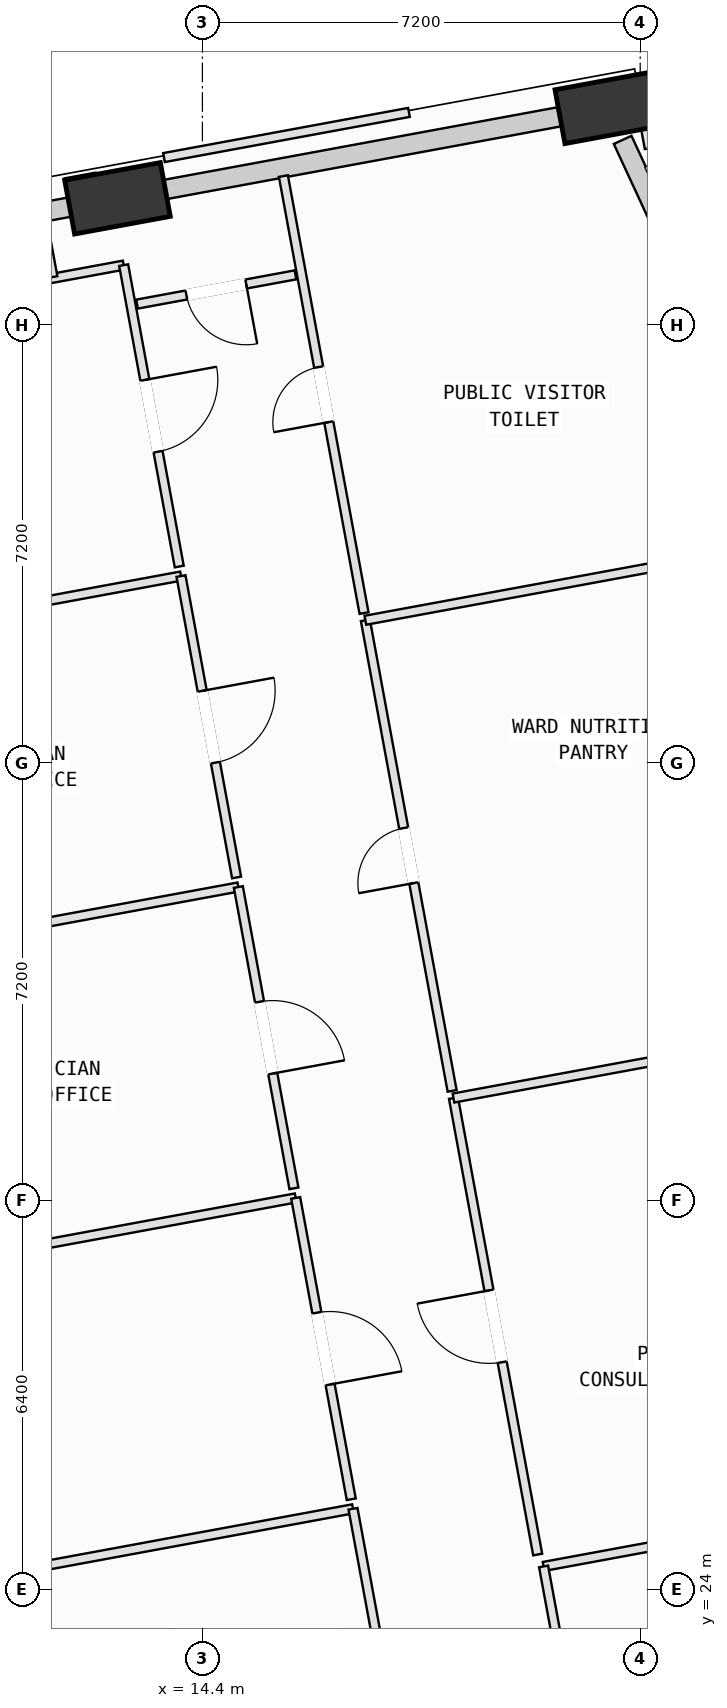
"""IFC4 building model, lengths in metres.
Left out: names, types, materials, properties, quantities, classifications, styles, units other than length and angle.
Written with IfcOpenShell. Run it as: python <this file> out.ifc"""

import sys

from ifc_helpers import new_model, si_unit, direction, frame, frame_2d, origin, origin_2d, place, context, subcontext, project, spatial, rectangle, extrude, element, fill, save


model = new_model("IFC4")
c1 = context("Model", 3, precision=1e-05, world=origin(), true_north=direction((0.0, 1.0)))
c2 = subcontext(c1, "Body", "Model", "MODEL_VIEW")
j1 = project(units=[si_unit("LENGTHUNIT", "METRE"), si_unit("PLANEANGLEUNIT", "RADIAN")], contexts=[c1])
p1 = place(None, origin())
s1 = spatial("IfcSite", under=j1, at=p1, CompositionType="ELEMENT")
p2 = place(p1, origin())
s2 = spatial("IfcBuilding", under=s1, at=p2, CompositionType="ELEMENT")
p3 = place(p2, frame((0.0, 0.0, 67.0)))
s3 = spatial("IfcBuildingStorey", under=s2, at=p3, CompositionType="ELEMENT", Elevation=67.0)
p4 = place(p3, frame((21.067, 48.368, 0.002), z_axis=(-0.09666113666, -0.052459310348, 0.99393392407), x_axis=(0.627529490688, -0.778337220111, 0.019947684239)))
e1 = element("IfcColumn", 1, at=p4, inside=s3, PredefinedType="COLUMN", context=c2, shape_type="SweptSolid", body=[
    extrude(rectangle(XDim=1.6, YDim=0.9, at=origin_2d()), origin(), (0.0, 0.0, 1.0), 4.021),
])
p5 = place(p3, frame((13.003, 46.88, 0.002), z_axis=(-0.090133434514, -0.085466134946, 0.992255765294), x_axis=(0.80725313107, -0.589775227835, 0.022529159111)))
e2 = element("IfcColumn", 2, at=p5, inside=s3, PredefinedType="COLUMN", context=c2, shape_type="SweptSolid", body=[
    extrude(rectangle(XDim=1.6, YDim=0.9, at=origin_2d()), origin(), (0.0, 0.0, 1.0), 4.028),
])
p6 = place(p3, frame((21.311, 47.841, 0.0), z_axis=(0.0, 0.0, 1.0), x_axis=(0.419944609939, -0.907549736699, 0.0)))
e3 = element("IfcWall", 3, at=p6, inside=s3, PredefinedType="SOLIDWALL", context=c2, shape_type="SweptSolid", body=[
    extrude(rectangle(XDim=4.889, YDim=0.32, at=frame_2d((2.445, 0.0))), origin(), (0.0, 0.0, 1.0), 3.165),
])
p7 = place(p6, frame((1.915, 0.0, 0.75)))
e4 = element("IfcOpeningElement", 4, at=p7, cuts=e3, PredefinedType="OPENING", context=c2, shape_type="SweptSolid", body=[
    extrude(rectangle(XDim=1.8, YDim=2.05, at=frame_2d((0.9, 1.025))), frame((0.0, 0.17, 0.0), z_axis=(0.0, -1.0, 0.0), x_axis=(1.0, 0.0, 0.0)), (0.0, 0.0, 1.0), 0.34),
])
p8 = place(p3, frame((13.38, 46.95, 0.0), z_axis=(0.0, 0.0, 1.0), x_axis=(0.98341213731, 0.181385137737, 0.0)))
e5 = element("IfcWall", 5, at=p8, inside=s3, PredefinedType="SOLIDWALL", context=c2, shape_type="SweptSolid", body=[
    extrude(rectangle(XDim=7.003, YDim=0.32, at=frame_2d((3.501, 0.0))), origin(), (0.0, 0.0, 1.0), 3.165),
])
p9 = place(p3, frame((5.297, 45.459, 0.0), z_axis=(0.0, 0.0, 1.0), x_axis=(0.983408574272, 0.181404454324, 0.0)))
e6 = element("IfcWall", 6, at=p9, inside=s3, PredefinedType="SOLIDWALL", context=c2, shape_type="SweptSolid", body=[
    extrude(rectangle(XDim=7.035, YDim=0.32, at=frame_2d((3.517, 0.0))), origin(), (0.0, 0.0, 1.0), 3.165),
])
p10 = place(p3, frame((6.094, 23.337, 0.0), z_axis=(0.0, 0.0, 1.0), x_axis=(0.983409627974, 0.181398742027, 0.0)))
e7 = element("IfcWall", 7, at=p10, inside=s3, PredefinedType="PARTITIONING", context=c2, shape_type="SweptSolid", body=[
    extrude(rectangle(XDim=10.965, YDim=0.15, at=frame_2d((5.482, 0.0))), origin(), (0.0, 0.0, 1.0), 3.78),
])
p11 = place(p3, frame((16.877, 25.326, 0.0), z_axis=(0.0, 0.0, 1.0), x_axis=(0.181511352998, -0.983388849201, 0.0)))
e8 = element("IfcWall", 8, at=p11, inside=s3, PredefinedType="PARTITIONING", context=c2, shape_type="SweptSolid", body=[
    extrude(rectangle(XDim=4.826, YDim=0.15, at=frame_2d((2.413, 0.0))), origin(), (0.0, 0.0, 1.0), 3.78),
])
p12 = place(p3, frame((4.792, 28.384, 0.0), z_axis=(0.0, 0.0, 1.0), x_axis=(0.983414775283, 0.181370834909, 0.0)))
e9 = element("IfcWall", 9, at=p12, inside=s3, PredefinedType="PARTITIONING", context=c2, shape_type="SweptSolid", body=[
    extrude(rectangle(XDim=11.33, YDim=0.15, at=frame_2d((5.665, 0.0))), origin(), (0.0, 0.0, 1.0), 3.78),
])
p13 = place(p3, frame((15.934, 30.439, 0.0), z_axis=(0.0, 0.0, 1.0), x_axis=(0.181327650792, -0.983422738734, 0.0)))
e10 = element("IfcWall", 10, at=p13, inside=s3, PredefinedType="PARTITIONING", context=c2, shape_type="SweptSolid", body=[
    extrude(rectangle(XDim=5.04, YDim=0.15, at=frame_2d((2.52, 0.0))), origin(), (0.0, 0.0, 1.0), 3.78),
])
p14 = place(p13, frame((1.92, 0.0, 0.0)))
e11 = element("IfcOpeningElement", 11, at=p14, cuts=e10, PredefinedType="OPENING", context=c2, shape_type="SweptSolid", body=[
    extrude(rectangle(XDim=1.2, YDim=2.15, at=frame_2d((0.6, 1.075))), frame((0.0, 0.085, 0.0), z_axis=(0.0, -1.0, 0.0), x_axis=(1.0, 0.0, 0.0)), (0.0, 0.0, 1.0), 0.17),
])
p15 = place(p3, frame((4.208, 33.564, 0.0), z_axis=(0.0, 0.0, 1.0), x_axis=(0.983409627974, 0.181398742027, 0.0)))
e12 = element("IfcWall", 12, at=p15, inside=s3, PredefinedType="PARTITIONING", context=c2, shape_type="SweptSolid", body=[
    extrude(rectangle(XDim=10.965, YDim=0.15, at=frame_2d((5.482, 0.0))), origin(), (0.0, 0.0, 1.0), 3.78),
])
p16 = place(p3, frame((14.991, 35.553, 0.0), z_axis=(0.0, 0.0, 1.0), x_axis=(0.181374501804, -0.983414098992, 0.0)))
e13 = element("IfcWall", 13, at=p16, inside=s3, PredefinedType="PARTITIONING", context=c2, shape_type="SweptSolid", body=[
    extrude(rectangle(XDim=5.04, YDim=0.15, at=frame_2d((2.52, 0.0))), origin(), (0.0, 0.0, 1.0), 3.78),
])
p17 = place(p16, frame((1.92, 0.0, 0.0)))
e14 = element("IfcOpeningElement", 14, at=p17, cuts=e13, PredefinedType="OPENING", context=c2, shape_type="SweptSolid", body=[
    extrude(rectangle(XDim=1.2, YDim=2.15, at=frame_2d((0.6, 1.075))), frame((0.0, 0.085, 0.0), z_axis=(0.0, -1.0, 0.0), x_axis=(1.0, 0.0, 0.0)), (0.0, 0.0, 1.0), 0.17),
])
p18 = place(p3, frame((3.265, 38.678, 0.0), z_axis=(0.0, 0.0, 1.0), x_axis=(0.983410360614, 0.181394770149, 0.0)))
e15 = element("IfcWall", 15, at=p18, inside=s3, PredefinedType="PARTITIONING", context=c2, shape_type="SweptSolid", body=[
    extrude(rectangle(XDim=10.965, YDim=0.15, at=frame_2d((5.482, 0.0))), origin(), (0.0, 0.0, 1.0), 3.78),
])
p19 = place(p3, frame((14.048, 40.667, 0.0), z_axis=(0.0, 0.0, 1.0), x_axis=(0.181293102456, -0.983429108275, 0.0)))
e16 = element("IfcWall", 16, at=p19, inside=s3, PredefinedType="PARTITIONING", context=c2, shape_type="SweptSolid", body=[
    extrude(rectangle(XDim=5.041, YDim=0.15, at=frame_2d((2.52, 0.0))), origin(), (0.0, 0.0, 1.0), 3.78),
])
p20 = place(p19, frame((1.92, 0.0, 0.0)))
e17 = element("IfcOpeningElement", 17, at=p20, cuts=e16, PredefinedType="OPENING", context=c2, shape_type="SweptSolid", body=[
    extrude(rectangle(XDim=1.2, YDim=2.15, at=frame_2d((0.6, 1.075))), frame((0.0, 0.085, 0.0), z_axis=(0.0, -1.0, 0.0), x_axis=(1.0, 0.0, 0.0)), (0.0, 0.0, 1.0), 0.17),
])
p21 = place(p3, frame((4.465, 44.187, 0.0), z_axis=(0.0, 0.0, 1.0), x_axis=(0.983403773202, 0.181430479393, 0.0)))
e18 = element("IfcWall", 18, at=p21, inside=s3, PredefinedType="PARTITIONING", context=c2, shape_type="SweptSolid", body=[
    extrude(rectangle(XDim=8.786, YDim=0.15, at=frame_2d((4.393, 0.0))), origin(), (0.0, 0.0, 1.0), 3.78),
])
p22 = place(p3, frame((13.105, 45.781, 0.0), z_axis=(0.0, 0.0, 1.0), x_axis=(0.181339945149, -0.983420471769, 0.0)))
e19 = element("IfcWall", 19, at=p22, inside=s3, PredefinedType="PARTITIONING", context=c2, shape_type="SweptSolid", body=[
    extrude(rectangle(XDim=5.041, YDim=0.15, at=frame_2d((2.52, 0.0))), origin(), (0.0, 0.0, 1.0), 2.865),
])
p23 = place(p22, frame((1.92, 0.0, 0.0)))
e20 = element("IfcOpeningElement", 20, at=p23, cuts=e19, PredefinedType="OPENING", context=c2, shape_type="SweptSolid", body=[
    extrude(rectangle(XDim=1.2, YDim=2.15, at=frame_2d((0.6, 1.075))), frame((0.0, 0.085, 0.0), z_axis=(0.0, -1.0, 0.0), x_axis=(1.0, 0.0, 0.0)), (0.0, 0.0, 1.0), 0.17),
])
p24 = place(p3, frame((20.011, 24.378, 0.0), z_axis=(0.0, 0.0, 1.0), x_axis=(0.983391113063, 0.181499087461, 0.0)))
e21 = element("IfcWall", 21, at=p24, inside=s3, PredefinedType="PARTITIONING", context=c2, shape_type="SweptSolid", body=[
    extrude(rectangle(XDim=6.755, YDim=0.15, at=frame_2d((3.378, 0.0))), origin(), (0.0, 0.0, 1.0), 3.78),
])
p25 = place(p3, frame((20.712, 20.58, 0.0), z_axis=(0.0, 0.0, 1.0), x_axis=(-0.181493870528, 0.983392075909, 0.0)))
e22 = element("IfcWall", 22, at=p25, inside=s3, PredefinedType="PARTITIONING", context=c2, shape_type="SweptSolid", body=[
    extrude(rectangle(XDim=3.862, YDim=0.15, at=frame_2d((1.931, 0.0))), origin(), (0.0, 0.0, 1.0), 3.78),
])
p26 = place(p3, frame((19.914, 24.574, 0.0), z_axis=(0.0, 0.0, 1.0), x_axis=(-0.181409034839, 0.983407729316, 0.0)))
e23 = element("IfcWall", 23, at=p26, inside=s3, PredefinedType="PARTITIONING", context=c2, shape_type="SweptSolid", body=[
    extrude(rectangle(XDim=7.635, YDim=0.15, at=frame_2d((3.817, 0.0))), origin(), (0.0, 0.0, 1.0), 3.78),
])
p27 = place(p26, frame((3.217, 0.0, 0.0)))
e24 = element("IfcOpeningElement", 24, at=p27, cuts=e23, PredefinedType="OPENING", context=c2, shape_type="SweptSolid", body=[
    extrude(rectangle(XDim=1.2, YDim=2.15, at=frame_2d((0.6, 1.075))), frame((0.0, 0.085, 0.0), z_axis=(0.0, -1.0, 0.0), x_axis=(1.0, 0.0, 0.0)), (0.0, 0.0, 1.0), 0.17),
])
p28 = place(p3, frame((18.529, 32.082, 0.0), z_axis=(0.0, 0.0, 1.0), x_axis=(0.98338778834, 0.181517100416, 0.0)))
e25 = element("IfcWall", 25, at=p28, inside=s3, PredefinedType="PARTITIONING", context=c2, shape_type="SweptSolid", body=[
    extrude(rectangle(XDim=6.815, YDim=0.15, at=frame_2d((3.408, 0.0))), origin(), (0.0, 0.0, 1.0), 3.78),
])
p29 = place(p3, frame((18.507, 32.2, 0.0), z_axis=(0.0, 0.0, 1.0), x_axis=(-0.181311647304, 0.98342568939, 0.0)))
e26 = element("IfcWall", 26, at=p29, inside=s3, PredefinedType="PARTITIONING", context=c2, shape_type="SweptSolid", body=[
    extrude(rectangle(XDim=7.87, YDim=0.15, at=frame_2d((3.935, 0.0))), origin(), (0.0, 0.0, 1.0), 3.78),
])
p30 = place(p29, frame((3.475, 0.0, 0.0)))
e27 = element("IfcOpeningElement", 27, at=p30, cuts=e26, PredefinedType="OPENING", context=c2, shape_type="SweptSolid", body=[
    extrude(rectangle(XDim=0.92, YDim=2.1, at=frame_2d((0.46, 1.05))), frame((0.0, 0.085, 0.0), z_axis=(0.0, -1.0, 0.0), x_axis=(1.0, 0.0, 0.0)), (0.0, 0.0, 1.0), 0.17),
])
p31 = place(p3, frame((17.08, 39.94, 0.0), z_axis=(0.0, 0.0, 1.0), x_axis=(0.983413357383, 0.181378522765, 0.0)))
e28 = element("IfcWall", 28, at=p31, inside=s3, PredefinedType="PARTITIONING", context=c2, shape_type="SweptSolid", body=[
    extrude(rectangle(XDim=6.815, YDim=0.15, at=frame_2d((3.407, 0.0))), origin(), (0.0, 0.0, 1.0), 3.78),
])
p32 = place(p3, frame((17.058, 40.058, 0.0), z_axis=(0.0, 0.0, 1.0), x_axis=(-0.181436165923, 0.983402724063, 0.0)))
e29 = element("IfcWall", 29, at=p32, inside=s3, PredefinedType="PARTITIONING", context=c2, shape_type="SweptSolid", body=[
    extrude(rectangle(XDim=7.309, YDim=0.15, at=frame_2d((3.655, 0.0))), origin(), (0.0, 0.0, 1.0), 3.78),
])
p33 = place(p32, frame((3.195, 0.0, 0.0)))
e30 = element("IfcOpeningElement", 30, at=p33, cuts=e29, PredefinedType="OPENING", context=c2, shape_type="SweptSolid", body=[
    extrude(rectangle(XDim=0.92, YDim=2.1, at=frame_2d((0.46, 1.05))), frame((0.0, 0.085, 0.0), z_axis=(0.0, -1.0, 0.0), x_axis=(1.0, 0.0, 0.0)), (0.0, 0.0, 1.0), 0.17),
])
p34 = place(p3, frame((20.232, 48.407, 0.0), z_axis=(0.0, 0.0, 1.0), x_axis=(0.983472476136, 0.181057694351, 0.0)))
e31 = element("IfcWall", 31, at=p34, inside=s3, PredefinedType="PARTITIONING", context=c2, shape_type="SweptSolid", body=[
    extrude(rectangle(XDim=1.365, YDim=0.15, at=frame_2d((0.682, 0.0))), origin(), (0.0, 0.0, 1.0), 3.165),
])
p35 = place(p3, frame((21.583, 48.605, 0.0), z_axis=(0.0, 0.0, 1.0), x_axis=(0.182022554583, -0.983294355533, 0.0)))
e32 = element("IfcWall", 32, at=p35, inside=s3, PredefinedType="PARTITIONING", context=c2, shape_type="SweptSolid", body=[
    extrude(rectangle(XDim=0.917, YDim=0.15, at=frame_2d((0.459, 0.0))), origin(), (0.0, 0.0, 1.0), 3.78),
])
p36 = place(p3, frame((11.769, 46.516, 0.0), z_axis=(0.0, 0.0, 1.0), x_axis=(0.181701071907, -0.983353812454, 0.0)))
e33 = element("IfcWall", 33, at=p36, inside=s3, PredefinedType="PARTITIONING", context=c2, shape_type="SweptSolid", body=[
    extrude(rectangle(XDim=0.946, YDim=0.15, at=frame_2d((0.473, 0.0))), origin(), (0.0, 0.0, 1.0), 3.78),
])
p37 = place(p3, frame((15.931, 45.621, 0.0), z_axis=(0.0, 0.0, 1.0), x_axis=(-0.983375347577, -0.18158448661, 0.0)))
e34 = element("IfcWall", 34, at=p37, inside=s3, PredefinedType="PARTITIONING", context=c2, shape_type="SweptSolid", body=[
    extrude(rectangle(XDim=2.65, YDim=0.15, at=frame_2d((1.325, 0.0))), origin(), (0.0, 0.0, 1.0), 3.78),
])
p38 = place(p37, frame((0.825, 0.0, 0.0)))
e35 = element("IfcOpeningElement", 35, at=p38, cuts=e34, PredefinedType="OPENING", context=c2, shape_type="SweptSolid", body=[
    extrude(rectangle(XDim=1.0, YDim=2.12, at=frame_2d((0.5, 1.06))), frame((0.0, 0.085, 0.0), z_axis=(0.0, -1.0, 0.0), x_axis=(1.0, 0.0, 0.0)), (0.0, 0.0, 1.0), 0.17),
])
p39 = place(p3, frame((13.768, 47.55, 0.0), z_axis=(0.0, 0.0, 1.0), x_axis=(0.983421602278, 0.181333814199, 0.0)))
e36 = element("IfcWall", 36, at=p39, inside=s3, PredefinedType="PARTITIONING", context=c2, shape_type="SweptSolid", body=[
    extrude(rectangle(XDim=4.097, YDim=0.15, at=frame_2d((2.048, 0.0))), origin(), (0.0, 0.0, 1.0), 3.78),
])
p40 = place(p14, origin())
e37 = element("IfcDoor", 37, at=p40, inside=s3, OperationType="SINGLE_SWING_RIGHT", PredefinedType="DOOR", context=c2, shape_type="SweptSolid", body=[
    extrude(rectangle(XDim=1.2, YDim=2.15, at=frame_2d((0.6, 1.075))), frame((0.0, 0.025, 0.0), z_axis=(0.0, -1.0, 0.0), x_axis=(1.0, 0.0, 0.0)), (0.0, 0.0, 1.0), 0.05),
])
fill(e11, e37)
p41 = place(p17, origin())
e38 = element("IfcDoor", 38, at=p41, inside=s3, OperationType="SINGLE_SWING_RIGHT", PredefinedType="DOOR", context=c2, shape_type="SweptSolid", body=[
    extrude(rectangle(XDim=1.2, YDim=2.15, at=frame_2d((0.6, 1.075))), frame((0.0, 0.025, 0.0), z_axis=(0.0, -1.0, 0.0), x_axis=(1.0, 0.0, 0.0)), (0.0, 0.0, 1.0), 0.05),
])
fill(e14, e38)
p42 = place(p20, origin())
e39 = element("IfcDoor", 39, at=p42, inside=s3, OperationType="SINGLE_SWING_LEFT", PredefinedType="DOOR", context=c2, shape_type="SweptSolid", body=[
    extrude(rectangle(XDim=1.2, YDim=2.15, at=frame_2d((0.6, 1.075))), frame((0.0, 0.025, 0.0), z_axis=(0.0, -1.0, 0.0), x_axis=(1.0, 0.0, 0.0)), (0.0, 0.0, 1.0), 0.05),
])
fill(e17, e39)
p43 = place(p23, origin())
e40 = element("IfcDoor", 40, at=p43, inside=s3, OperationType="SINGLE_SWING_LEFT", PredefinedType="DOOR", context=c2, shape_type="SweptSolid", body=[
    extrude(rectangle(XDim=1.2, YDim=2.15, at=frame_2d((0.6, 1.075))), frame((0.0, 0.025, 0.0), z_axis=(0.0, -1.0, 0.0), x_axis=(1.0, 0.0, 0.0)), (0.0, 0.0, 1.0), 0.05),
])
fill(e20, e40)
p44 = place(p27, origin())
e41 = element("IfcDoor", 41, at=p44, inside=s3, OperationType="SINGLE_SWING_RIGHT", PredefinedType="DOOR", context=c2, shape_type="SweptSolid", body=[
    extrude(rectangle(XDim=1.2, YDim=2.15, at=frame_2d((0.6, 1.075))), frame((0.0, 0.025, 0.0), z_axis=(0.0, -1.0, 0.0), x_axis=(1.0, 0.0, 0.0)), (0.0, 0.0, 1.0), 0.05),
])
fill(e24, e41)
p45 = place(p30, origin())
e42 = element("IfcDoor", 42, at=p45, inside=s3, OperationType="SINGLE_SWING_LEFT", PredefinedType="DOOR", context=c2, shape_type="SweptSolid", body=[
    extrude(rectangle(XDim=0.92, YDim=2.1, at=frame_2d((0.46, 1.05))), frame((0.0, 0.025, 0.0), z_axis=(0.0, -1.0, 0.0), x_axis=(1.0, 0.0, 0.0)), (0.0, 0.0, 1.0), 0.05),
])
fill(e27, e42)
p46 = place(p33, origin())
e43 = element("IfcDoor", 43, at=p46, inside=s3, OperationType="SINGLE_SWING_LEFT", PredefinedType="DOOR", context=c2, shape_type="SweptSolid", body=[
    extrude(rectangle(XDim=0.92, YDim=2.1, at=frame_2d((0.46, 1.05))), frame((0.0, 0.025, 0.0), z_axis=(0.0, -1.0, 0.0), x_axis=(1.0, 0.0, 0.0)), (0.0, 0.0, 1.0), 0.05),
])
fill(e30, e43)
p47 = place(p38, origin())
e44 = element("IfcDoor", 44, at=p47, inside=s3, OperationType="SINGLE_SWING_LEFT", PredefinedType="DOOR", context=c2, shape_type="SweptSolid", body=[
    extrude(rectangle(XDim=1.0, YDim=2.12, at=frame_2d((0.5, 1.06))), frame((0.0, 0.025, 0.0), z_axis=(0.0, -1.0, 0.0), x_axis=(1.0, 0.0, 0.0)), (0.0, 0.0, 1.0), 0.05),
])
fill(e35, e44)
save(model, sys.argv[1])
